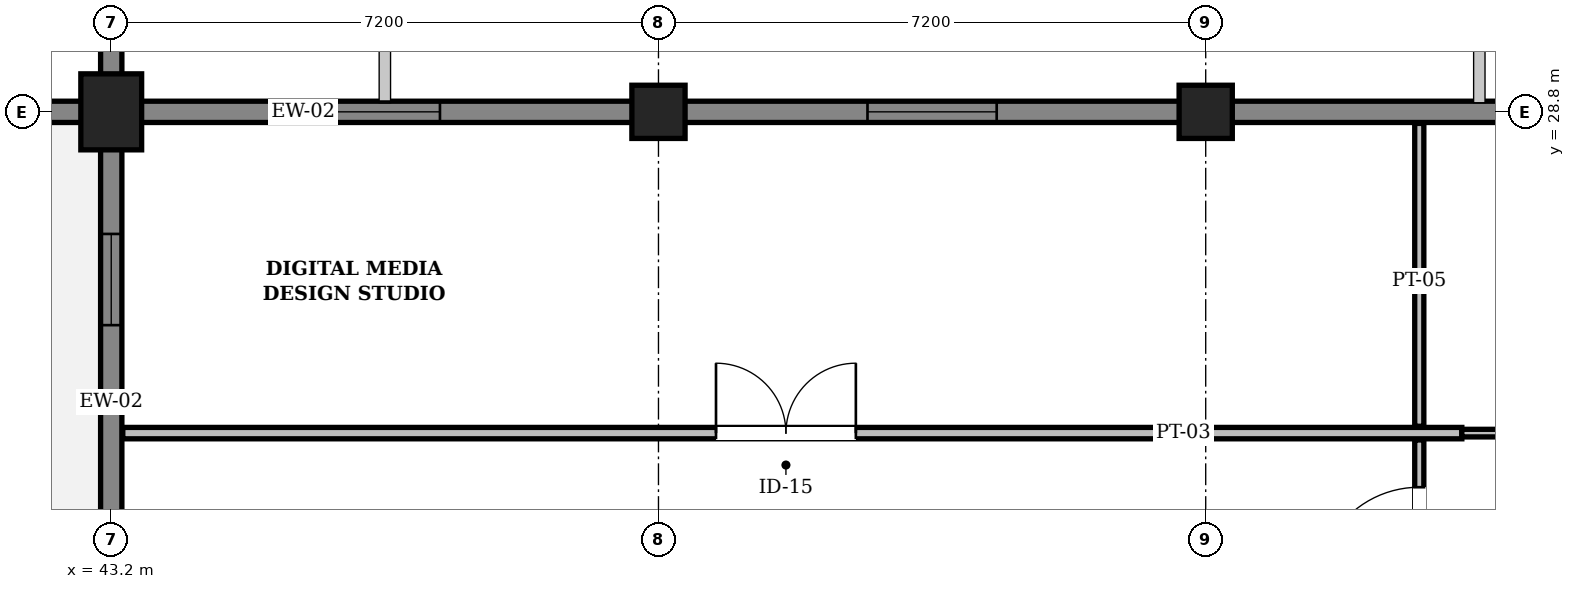
"""IFC4 building model, lengths in metres.
Left out: names, types, materials, properties, quantities, classifications, styles, units other than length and angle.
Written with IfcOpenShell. Run it as: python <this file> out.ifc"""

import sys

from ifc_helpers import new_model, si_unit, direction, frame, frame_2d, origin, origin_2d, place, context, subcontext, project, spatial, rectangle, extrude, element, fill, save


model = new_model("IFC4")
c1 = context("Model", 3, precision=1e-05, world=origin(), true_north=direction((0.0, 1.0)))
c2 = subcontext(c1, "Body", "Model", "MODEL_VIEW")
j1 = project(units=[si_unit("LENGTHUNIT", "METRE"), si_unit("PLANEANGLEUNIT", "RADIAN")], contexts=[c1])
p1 = place(None, origin())
s1 = spatial("IfcSite", under=j1, at=p1, CompositionType="ELEMENT")
p2 = place(p1, origin())
s2 = spatial("IfcBuilding", under=s1, at=p2, CompositionType="ELEMENT")
p3 = place(p2, frame((0.0, 0.0, 18.9)))
s3 = spatial("IfcBuildingStorey", under=s2, at=p3, CompositionType="ELEMENT", Elevation=18.9)
p4 = place(p3, frame((43.2, 28.8, 0.0), z_axis=(0.0, 0.0, 1.0), x_axis=(1.0, 0.0, 0.0)))
e1 = element("IfcColumn", 1, at=p4, inside=s3, PredefinedType="COLUMN", context=c2, shape_type="SweptSolid", body=[
    extrude(rectangle(XDim=0.8, YDim=1.0, at=origin_2d()), origin(), (0.0, 0.0, 1.0), 4.5),
])
for number, where, z_axis, x_axis in (
    (2, (50.4, 28.8, 0.0), (0.0, 0.0, 1.0), (1.0, 0.0, 0.0)),
    (3, (57.6, 28.8, 0.0), (0.0, 0.0, 1.0), (1.0, 0.0, 0.0)),
):
    element("IfcColumn", number, at=place(p3, frame(where, z_axis=z_axis, x_axis=x_axis)), inside=s3, PredefinedType="COLUMN", context=c2, shape_type="SweptSolid", body=[
        extrude(rectangle(XDim=0.7, YDim=0.7, at=origin_2d()), origin(), (0.0, 0.0, 1.0), 4.5),
    ])
p5 = place(p3, frame((43.2, 21.6, 0.0), z_axis=(0.0, 0.0, 1.0), x_axis=(0.0, 1.0, 0.0)))
e4 = element("IfcWall", 4, at=p5, inside=s3, PredefinedType="SOLIDWALL", context=c2, shape_type="SweptSolid", body=[
    extrude(rectangle(XDim=7.034, YDim=0.28, at=frame_2d((3.517, 0.0))), origin(), (0.0, 0.0, 1.0), 4.22),
])
p6 = place(p5, frame((4.394, 0.0, 0.95)))
e5 = element("IfcOpeningElement", 5, at=p6, cuts=e4, PredefinedType="OPENING", context=c2, shape_type="SweptSolid", body=[
    extrude(rectangle(XDim=1.2, YDim=1.8, at=frame_2d((0.6, 0.9))), frame((0.0, 0.152, 0.0), z_axis=(0.0, -1.0, 0.0), x_axis=(1.0, 0.0, 0.0)), (0.0, 0.0, 1.0), 0.304),
])
p7 = place(p3, frame((43.2, 28.8, 0.0), z_axis=(0.0, 0.0, 1.0), x_axis=(1.0, 0.0, 0.0)))
e6 = element("IfcWall", 6, at=p7, inside=s3, PredefinedType="SOLIDWALL", context=c2, shape_type="SweptSolid", body=[
    extrude(rectangle(XDim=7.2, YDim=0.28, at=frame_2d((3.6, 0.0))), origin(), (0.0, 0.0, 1.0), 4.22),
])
p8 = place(p7, frame((2.875, 0.0, 0.95)))
e7 = element("IfcOpeningElement", 7, at=p8, cuts=e6, PredefinedType="OPENING", context=c2, shape_type="SweptSolid", body=[
    extrude(rectangle(XDim=1.45, YDim=1.8, at=frame_2d((0.725, 0.9))), frame((0.0, 0.152, 0.0), z_axis=(0.0, -1.0, 0.0), x_axis=(1.0, 0.0, 0.0)), (0.0, 0.0, 1.0), 0.304),
])
p9 = place(p3, frame((50.4, 28.8, 0.0), z_axis=(0.0, 0.0, 1.0), x_axis=(1.0, 0.0, 0.0)))
e8 = element("IfcWall", 8, at=p9, inside=s3, PredefinedType="SOLIDWALL", context=c2, shape_type="SweptSolid", body=[
    extrude(rectangle(XDim=7.2, YDim=0.28, at=frame_2d((3.6, 0.0))), origin(), (0.0, 0.0, 1.0), 4.22),
])
p10 = place(p9, frame((2.75, 0.0, 0.95)))
e9 = element("IfcOpeningElement", 9, at=p10, cuts=e8, PredefinedType="OPENING", context=c2, shape_type="SweptSolid", body=[
    extrude(rectangle(XDim=1.7, YDim=1.8, at=frame_2d((0.85, 0.9))), frame((0.0, 0.152, 0.0), z_axis=(0.0, -1.0, 0.0), x_axis=(1.0, 0.0, 0.0)), (0.0, 0.0, 1.0), 0.304),
])
p11 = place(p3, frame((57.6, 28.8, 0.0), z_axis=(0.0, 0.0, 1.0), x_axis=(1.0, 0.0, 0.0)))
e10 = element("IfcWall", 10, at=p11, inside=s3, PredefinedType="SOLIDWALL", context=c2, shape_type="SweptSolid", body=[
    extrude(rectangle(XDim=7.2, YDim=0.28, at=frame_2d((3.6, 0.0))), origin(), (0.0, 0.0, 1.0), 4.22),
])
p12 = place(p11, frame((4.02, 0.0, 0.95)))
e11 = element("IfcOpeningElement", 11, at=p12, cuts=e10, PredefinedType="OPENING", context=c2, shape_type="SweptSolid", body=[
    extrude(rectangle(XDim=1.95, YDim=1.8, at=frame_2d((0.975, 0.9))), frame((0.0, 0.152, 0.0), z_axis=(0.0, -1.0, 0.0), x_axis=(1.0, 0.0, 0.0)), (0.0, 0.0, 1.0), 0.304),
])
p13 = place(p3, frame((43.2, 36.0, 0.0), z_axis=(0.0, 0.0, 1.0), x_axis=(0.0, -1.0, 0.0)))
e12 = element("IfcWall", 12, at=p13, inside=s3, PredefinedType="SOLIDWALL", context=c2, shape_type="SweptSolid", body=[
    extrude(rectangle(XDim=7.034, YDim=0.28, at=frame_2d((3.517, 0.0))), origin(), (0.0, 0.0, 1.0), 4.22),
])
p14 = place(p13, frame((4.402, 0.0, 0.95)))
e13 = element("IfcOpeningElement", 13, at=p14, cuts=e12, PredefinedType="OPENING", context=c2, shape_type="SweptSolid", body=[
    extrude(rectangle(XDim=1.55, YDim=1.55, at=frame_2d((0.775, 0.775))), frame((0.0, 0.152, 0.0), z_axis=(0.0, -1.0, 0.0), x_axis=(1.0, 0.0, 0.0)), (0.0, 0.0, 1.0), 0.304),
])
p15 = place(p3, frame((43.2, 28.8, 0.0), z_axis=(0.0, 0.0, 1.0), x_axis=(-1.0, 0.0, 0.0)))
e14 = element("IfcWall", 14, at=p15, inside=s3, PredefinedType="SOLIDWALL", context=c2, shape_type="SweptSolid", body=[
    extrude(rectangle(XDim=7.2, YDim=0.28, at=frame_2d((3.6, 0.0))), origin(), (0.0, 0.0, 1.0), 4.22),
])
p16 = place(p15, frame((4.41, 0.0, 0.95)))
e15 = element("IfcOpeningElement", 15, at=p16, cuts=e14, PredefinedType="OPENING", context=c2, shape_type="SweptSolid", body=[
    extrude(rectangle(XDim=1.7, YDim=1.55, at=frame_2d((0.85, 0.775))), frame((0.0, 0.152, 0.0), z_axis=(0.0, -1.0, 0.0), x_axis=(1.0, 0.0, 0.0)), (0.0, 0.0, 1.0), 0.304),
])
p17 = place(p3, frame((43.352, 24.573, 0.0), z_axis=(0.0, 0.0, 1.0), x_axis=(1.0, 0.0, 0.0)))
e16 = element("IfcWall", 16, at=p17, inside=s3, PredefinedType="PARTITIONING", context=c2, shape_type="SweptSolid", body=[
    extrude(rectangle(XDim=17.618, YDim=0.15, at=frame_2d((8.809, 0.0))), origin(), (0.0, 0.0, 1.0), 4.16),
])
p18 = place(p17, frame((7.805, 0.0, 0.0)))
e17 = element("IfcOpeningElement", 17, at=p18, cuts=e16, PredefinedType="OPENING", context=c2, shape_type="SweptSolid", body=[
    extrude(rectangle(XDim=1.84, YDim=2.3, at=frame_2d((0.92, 1.15))), frame((0.0, 0.087, 0.0), z_axis=(0.0, -1.0, 0.0), x_axis=(1.0, 0.0, 0.0)), (0.0, 0.0, 1.0), 0.174),
])
p19 = place(p3, frame((60.41, 18.3, 0.0), z_axis=(0.0, 0.0, 1.0), x_axis=(0.0, 1.0, 0.0)))
e18 = element("IfcWall", 18, at=p19, inside=s3, PredefinedType="PARTITIONING", context=c2, shape_type="SweptSolid", body=[
    extrude(rectangle(XDim=6.183, YDim=0.12, at=frame_2d((3.092, 0.0))), origin(), (0.0, 0.0, 1.0), 4.16),
])
p20 = place(p19, frame((2.482, 0.0, 0.0)))
e19 = element("IfcOpeningElement", 19, at=p20, cuts=e18, PredefinedType="OPENING", context=c2, shape_type="SweptSolid", body=[
    extrude(rectangle(XDim=1.22, YDim=2.22, at=frame_2d((0.61, 1.11))), frame((0.0, 0.072, 0.0), z_axis=(0.0, -1.0, 0.0), x_axis=(1.0, 0.0, 0.0)), (0.0, 0.0, 1.0), 0.144),
])
p21 = place(p19, frame((0.652, 0.0, 0.0)))
e20 = element("IfcOpeningElement", 20, at=p21, cuts=e18, PredefinedType="OPENING", context=c2, shape_type="SweptSolid", body=[
    extrude(rectangle(XDim=1.28, YDim=2.22, at=frame_2d((0.64, 1.11))), frame((0.0, 0.072, 0.0), z_axis=(0.0, -1.0, 0.0), x_axis=(1.0, 0.0, 0.0)), (0.0, 0.0, 1.0), 0.144),
])
p22 = place(p19, frame((4.222, 0.0, 0.0)))
e21 = element("IfcOpeningElement", 21, at=p22, cuts=e18, PredefinedType="OPENING", context=c2, shape_type="SweptSolid", body=[
    extrude(rectangle(XDim=1.34, YDim=2.24, at=frame_2d((0.67, 1.12))), frame((0.0, 0.072, 0.0), z_axis=(0.0, -1.0, 0.0), x_axis=(1.0, 0.0, 0.0)), (0.0, 0.0, 1.0), 0.144),
])
p23 = place(p3, frame((60.41, 24.663, 0.0), z_axis=(0.0, 0.0, 1.0), x_axis=(0.0, 1.0, 0.0)))
e22 = element("IfcWall", 22, at=p23, inside=s3, PredefinedType="PARTITIONING", context=c2, shape_type="SweptSolid", body=[
    extrude(rectangle(XDim=3.985, YDim=0.12, at=frame_2d((1.992, 0.0))), origin(), (0.0, 0.0, 1.0), 4.16),
])
p24 = place(p3, frame((60.97, 24.573, 0.0), z_axis=(0.0, 0.0, 1.0), x_axis=(1.0, 0.0, 0.0)))
e23 = element("IfcWall", 23, at=p24, inside=s3, PredefinedType="PARTITIONING", context=c2, shape_type="SweptSolid", body=[
    extrude(rectangle(XDim=16.99, YDim=0.1, at=frame_2d((8.495, 0.0))), origin(), (0.0, 0.0, 1.0), 4.16),
])
p25 = place(p24, frame((7.535, 0.0, 0.0)))
e24 = element("IfcOpeningElement", 24, at=p25, cuts=e23, PredefinedType="OPENING", context=c2, shape_type="SweptSolid", body=[
    extrude(rectangle(XDim=1.92, YDim=2.32, at=frame_2d((0.96, 1.16))), frame((0.0, 0.062, 0.0), z_axis=(0.0, -1.0, 0.0), x_axis=(1.0, 0.0, 0.0)), (0.0, 0.0, 1.0), 0.124),
])
p26 = place(p6, origin())
e25 = element("IfcWindow", 25, at=p26, inside=s3, PartitioningType="SINGLE_PANEL", PredefinedType="WINDOW", context=c2, shape_type="SweptSolid", body=[
    extrude(rectangle(XDim=1.2, YDim=1.8, at=frame_2d((0.6, 0.9))), frame((0.0, 0.03, 0.0), z_axis=(0.0, -1.0, 0.0), x_axis=(1.0, 0.0, 0.0)), (0.0, 0.0, 1.0), 0.06),
])
fill(e5, e25)
p27 = place(p8, origin())
e26 = element("IfcWindow", 26, at=p27, inside=s3, PartitioningType="SINGLE_PANEL", PredefinedType="WINDOW", context=c2, shape_type="SweptSolid", body=[
    extrude(rectangle(XDim=1.45, YDim=1.8, at=frame_2d((0.725, 0.9))), frame((0.0, 0.03, 0.0), z_axis=(0.0, -1.0, 0.0), x_axis=(1.0, 0.0, 0.0)), (0.0, 0.0, 1.0), 0.06),
])
fill(e7, e26)
p28 = place(p10, origin())
e27 = element("IfcWindow", 27, at=p28, inside=s3, PartitioningType="SINGLE_PANEL", PredefinedType="WINDOW", context=c2, shape_type="SweptSolid", body=[
    extrude(rectangle(XDim=1.7, YDim=1.8, at=frame_2d((0.85, 0.9))), frame((0.0, 0.03, 0.0), z_axis=(0.0, -1.0, 0.0), x_axis=(1.0, 0.0, 0.0)), (0.0, 0.0, 1.0), 0.06),
])
fill(e9, e27)
p29 = place(p18, origin())
e28 = element("IfcDoor", 28, at=p29, inside=s3, OperationType="DOUBLE_DOOR_SINGLE_SWING", PredefinedType="DOOR", context=c2, shape_type="SweptSolid", body=[
    extrude(rectangle(XDim=1.84, YDim=2.3, at=frame_2d((0.92, 1.15))), frame((0.0, 0.025, 0.0), z_axis=(0.0, -1.0, 0.0), x_axis=(1.0, 0.0, 0.0)), (0.0, 0.0, 1.0), 0.05),
])
fill(e17, e28)
p30 = place(p22, origin())
e29 = element("IfcDoor", 29, at=p30, inside=s3, OperationType="SINGLE_SWING_LEFT", PredefinedType="DOOR", context=c2, shape_type="SweptSolid", body=[
    extrude(rectangle(XDim=1.34, YDim=2.24, at=frame_2d((0.67, 1.12))), frame((0.0, 0.025, 0.0), z_axis=(0.0, -1.0, 0.0), x_axis=(1.0, 0.0, 0.0)), (0.0, 0.0, 1.0), 0.05),
])
fill(e21, e29)
save(model, sys.argv[1])
